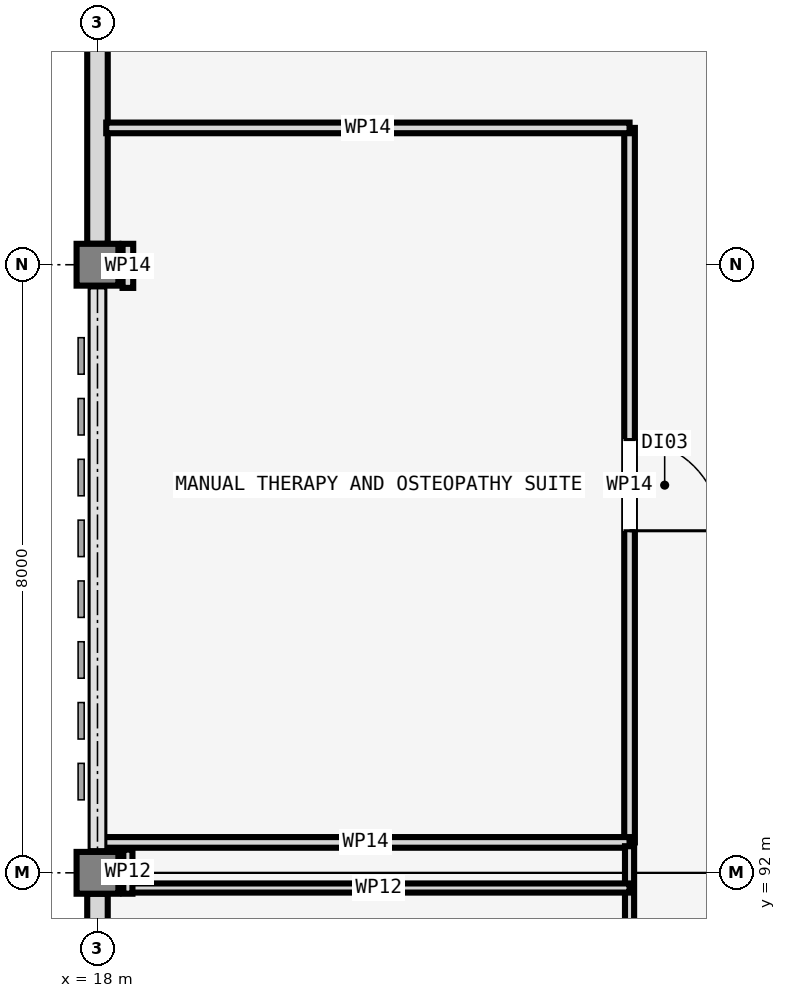
"""IFC4 building model, lengths in metres.
Left out: names, types, materials, properties, quantities, classifications, styles, units other than length and angle.
Written with IfcOpenShell. Run it as: python <this file> out.ifc"""

import sys

from ifc_helpers import new_model, si_unit, direction, frame, frame_2d, origin, origin_2d, place, context, subcontext, project, spatial, rectangle, extrude, element, fill, save


model = new_model("IFC4")
c1 = context("Model", 3, precision=1e-05, world=origin(), true_north=direction((0.0, 1.0)))
c2 = subcontext(c1, "Body", "Model", "MODEL_VIEW")
j1 = project(units=[si_unit("LENGTHUNIT", "METRE"), si_unit("PLANEANGLEUNIT", "RADIAN")], contexts=[c1])
p1 = place(None, origin())
s1 = spatial("IfcSite", under=j1, at=p1, CompositionType="ELEMENT")
p2 = place(p1, origin())
s2 = spatial("IfcBuilding", under=s1, at=p2, CompositionType="ELEMENT")
p3 = place(p2, frame((0.0, 0.0, 9.3)))
s3 = spatial("IfcBuildingStorey", under=s2, at=p3, CompositionType="ELEMENT", Elevation=9.3)
for number, where, z_axis, x_axis in (
    (1, (18.0, 92.0, 0.0), (0.0, 0.0, 1.0), (1.0, 0.0, 0.0)),
    (2, (18.0, 100.0, 0.0), (0.0, 0.0, 1.0), (1.0, 0.0, 0.0)),
):
    element("IfcColumn", number, at=place(p3, frame(where, z_axis=z_axis, x_axis=x_axis)), inside=s3, PredefinedType="COLUMN", context=c2, shape_type="SweptSolid", body=[
        extrude(rectangle(XDim=0.55, YDim=0.55, at=origin_2d()), origin(), (0.0, 0.0, 1.0), 4.2),
    ])
p4 = place(p3, frame((18.0, 91.725, 0.0), z_axis=(0.0, 0.0, 1.0), x_axis=(0.0, -1.0, 0.0)))
e3 = element("IfcWall", 3, at=p4, inside=s3, PredefinedType="SOLIDWALL", context=c2, shape_type="SweptSolid", body=[
    extrude(rectangle(XDim=7.45, YDim=0.27, at=frame_2d((3.725, 0.0))), origin(), (0.0, 0.0, 1.0), 3.22),
])
p5 = place(p4, frame((2.875, 0.0, 0.95)))
e4 = element("IfcOpeningElement", 4, at=p5, cuts=e3, PredefinedType="OPENING", context=c2, shape_type="SweptSolid", body=[
    extrude(rectangle(XDim=1.7, YDim=1.55, at=frame_2d((0.85, 0.775))), frame((0.0, 0.145, 0.0), z_axis=(0.0, -1.0, 0.0), x_axis=(1.0, 0.0, 0.0)), (0.0, 0.0, 1.0), 0.29),
])
p6 = place(p3, frame((18.0, 107.725, 0.0), z_axis=(0.0, 0.0, 1.0), x_axis=(0.0, -1.0, 0.0)))
e5 = element("IfcWall", 5, at=p6, inside=s3, PredefinedType="SOLIDWALL", context=c2, shape_type="SweptSolid", body=[
    extrude(rectangle(XDim=7.45, YDim=0.27, at=frame_2d((3.725, 0.0))), origin(), (0.0, 0.0, 1.0), 3.22),
])
p7 = place(p6, frame((2.875, 0.0, 0.95)))
e6 = element("IfcOpeningElement", 6, at=p7, cuts=e5, PredefinedType="OPENING", context=c2, shape_type="SweptSolid", body=[
    extrude(rectangle(XDim=1.7, YDim=1.55, at=frame_2d((0.85, 0.775))), frame((0.0, 0.145, 0.0), z_axis=(0.0, -1.0, 0.0), x_axis=(1.0, 0.0, 0.0)), (0.0, 0.0, 1.0), 0.29),
])
p8 = place(p3, frame((25.0, 101.8, 0.0), z_axis=(0.0, 0.0, 1.0), x_axis=(0.0, -1.0, 0.0)))
e7 = element("IfcWall", 7, at=p8, inside=s3, PredefinedType="PARTITIONING", context=c2, shape_type="SweptSolid", body=[
    extrude(rectangle(XDim=9.4, YDim=0.14, at=frame_2d((4.7, 0.0))), origin(), (0.0, 0.0, 1.0), 3.12),
])
p9 = place(p8, frame((4.1, 0.0, 0.0)))
e8 = element("IfcOpeningElement", 8, at=p9, cuts=e7, PredefinedType="OPENING", context=c2, shape_type="SweptSolid", body=[
    extrude(rectangle(XDim=1.2, YDim=2.15, at=frame_2d((0.6, 1.075))), frame((0.0, 0.08, 0.0), z_axis=(0.0, -1.0, 0.0), x_axis=(1.0, 0.0, 0.0)), (0.0, 0.0, 1.0), 0.16),
])
p10 = place(p3, frame((18.115, 101.8, 0.0), z_axis=(0.0, 0.0, 1.0), x_axis=(1.0, 0.0, 0.0)))
e9 = element("IfcWall", 9, at=p10, inside=s3, PredefinedType="PARTITIONING", context=c2, shape_type="SweptSolid", body=[
    extrude(rectangle(XDim=6.885, YDim=0.14, at=frame_2d((3.442, 0.0))), origin(), (0.0, 0.0, 1.0), 3.12),
])
p11 = place(p3, frame((18.4, 99.695, 0.0), z_axis=(0.0, 0.0, 1.0), x_axis=(0.0, 1.0, 0.0)))
e10 = element("IfcWall", 10, at=p11, inside=s3, PredefinedType="PARTITIONING", context=c2, shape_type="SweptSolid", body=[
    extrude(rectangle(XDim=0.58, YDim=0.14, at=frame_2d((0.29, 0.0))), origin(), (0.0, 0.0, 1.0), 3.12),
])
p12 = place(p3, frame((25.0, 92.4, 0.0), z_axis=(0.0, 0.0, 1.0), x_axis=(-1.0, 0.0, 0.0)))
e11 = element("IfcWall", 11, at=p12, inside=s3, PredefinedType="PARTITIONING", context=c2, shape_type="SweptSolid", body=[
    extrude(rectangle(XDim=6.945, YDim=0.14, at=frame_2d((3.473, 0.0))), origin(), (0.0, 0.0, 1.0), 3.12),
])
p13 = place(p3, frame((25.0, 92.35, 0.0), z_axis=(0.0, 0.0, 1.0), x_axis=(0.0, -1.0, 0.0)))
e12 = element("IfcWall", 12, at=p13, inside=s3, PredefinedType="PARTITIONING", context=c2, shape_type="SweptSolid", body=[
    extrude(rectangle(XDim=25.95, YDim=0.12, at=frame_2d((12.975, 0.0))), origin(), (0.0, 0.0, 1.0), 3.12),
])
p14 = place(p13, frame((12.475, 0.0, 0.0)))
e13 = element("IfcOpeningElement", 13, at=p14, cuts=e12, PredefinedType="OPENING", context=c2, shape_type="SweptSolid", body=[
    extrude(rectangle(XDim=1.0, YDim=2.1, at=frame_2d((0.5, 1.05))), frame((0.0, 0.07, 0.0), z_axis=(0.0, -1.0, 0.0), x_axis=(1.0, 0.0, 0.0)), (0.0, 0.0, 1.0), 0.14),
])
p15 = place(p3, frame((18.4, 91.8, 0.0), z_axis=(0.0, 0.0, 1.0), x_axis=(1.0, 0.0, 0.0)))
e14 = element("IfcWall", 14, at=p15, inside=s3, PredefinedType="PARTITIONING", context=c2, shape_type="SweptSolid", body=[
    extrude(rectangle(XDim=6.6, YDim=0.12, at=frame_2d((3.3, 0.0))), origin(), (0.0, 0.0, 1.0), 3.12),
])
p16 = place(p3, frame((18.4, 91.725, 0.0), z_axis=(0.0, 0.0, 1.0), x_axis=(0.0, 1.0, 0.0)))
e15 = element("IfcWall", 15, at=p16, inside=s3, PredefinedType="PARTITIONING", context=c2, shape_type="SweptSolid", body=[
    extrude(rectangle(XDim=0.58, YDim=0.12, at=frame_2d((0.29, 0.0))), origin(), (0.0, 0.0, 1.0), 3.12),
])
p17 = place(p9, origin())
e16 = element("IfcDoor", 16, at=p17, inside=s3, OperationType="SINGLE_SWING_RIGHT", PredefinedType="DOOR", context=c2, shape_type="SweptSolid", body=[
    extrude(rectangle(XDim=1.2, YDim=2.15, at=frame_2d((0.6, 1.075))), frame((0.0, 0.025, 0.0), z_axis=(0.0, -1.0, 0.0), x_axis=(1.0, 0.0, 0.0)), (0.0, 0.0, 1.0), 0.05),
])
fill(e8, e16)
save(model, sys.argv[1])
